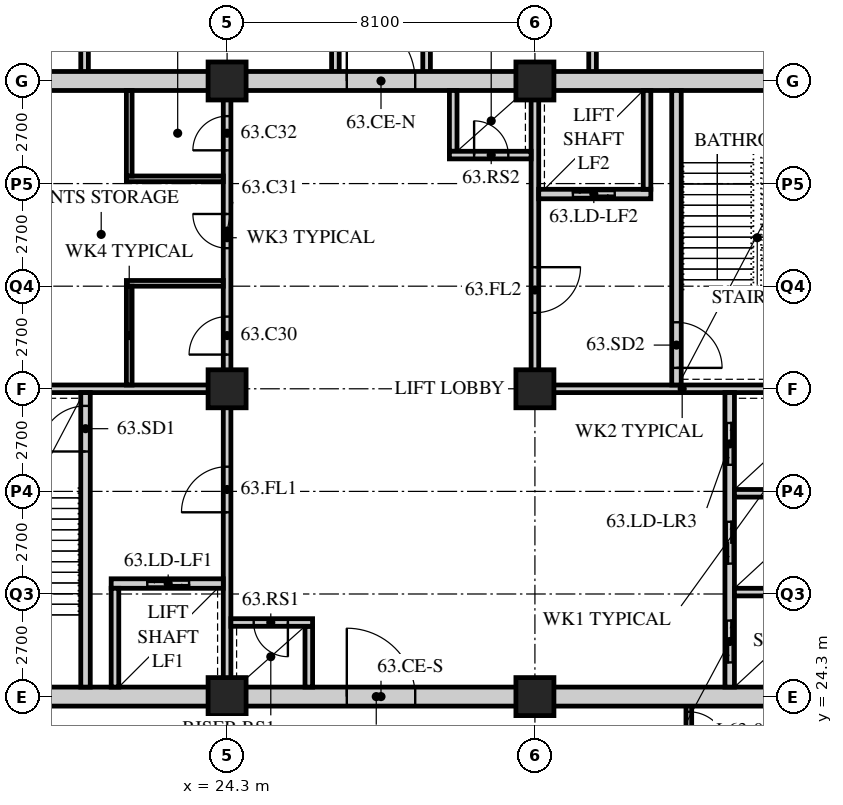
"""IFC4 building model, lengths in metres.
Left out: names, types, materials, properties, quantities, classifications, styles, units other than length and angle.
Written with IfcOpenShell. Run it as: python <this file> out.ifc"""

import sys

from ifc_helpers import new_model, si_unit, direction, frame, frame_2d, origin, origin_2d, place, context, subcontext, project, spatial, rectangle, hollow_rectangle, extrude, element, fill, save


model = new_model("IFC4")
c1 = context("Model", 3, precision=1e-05, world=origin(), true_north=direction((0.0, 1.0)))
c2 = subcontext(c1, "Body", "Model", "MODEL_VIEW")
j1 = project(units=[si_unit("LENGTHUNIT", "METRE"), si_unit("PLANEANGLEUNIT", "RADIAN")], contexts=[c1])
p1 = place(None, origin())
s1 = spatial("IfcSite", under=j1, at=p1, CompositionType="ELEMENT")
p2 = place(p1, origin())
s2 = spatial("IfcBuilding", under=s1, at=p2, CompositionType="ELEMENT")
p3 = place(p2, frame((0.0, 0.0, 246.3)))
s3 = spatial("IfcBuildingStorey", under=s2, at=p3, CompositionType="ELEMENT", Elevation=246.3)
for number, where, z_axis, x_axis in (
    (1, (24.3, 24.3, 0.0), (0.0, 0.0, 1.0), (1.0, 0.0, 0.0)),
    (2, (24.3, 32.4, 0.0), (0.0, 0.0, 1.0), (1.0, 0.0, 0.0)),
    (3, (24.3, 40.5, 0.0), (0.0, 0.0, 1.0), (1.0, 0.0, 0.0)),
    (4, (32.4, 24.3, 0.0), (0.0, 0.0, 1.0), (1.0, 0.0, 0.0)),
    (5, (32.4, 32.4, 0.0), (0.0, 0.0, 1.0), (1.0, 0.0, 0.0)),
    (6, (32.4, 40.5, 0.0), (0.0, 0.0, 1.0), (1.0, 0.0, 0.0)),
):
    element("IfcColumn", number, at=place(p3, frame(where, z_axis=z_axis, x_axis=x_axis)), inside=s3, PredefinedType="COLUMN", context=c2, shape_type="SweptSolid", body=[
        extrude(hollow_rectangle(XDim=1.0, YDim=1.0, WallThickness=0.1, at=origin_2d()), origin(), (0.0, 0.0, 1.0), 3.9),
    ])
for number, where, z_axis, x_axis in (
    (7, (20.55, 50.85, 0.0), (0.0, 0.0, 1.0), (0.0, -1.0, 0.0)),
    (8, (33.917, 50.85, 0.0), (0.0, 0.0, 1.0), (0.0, -1.0, 0.0)),
    (9, (27.15, 40.5, 0.0), (0.0, 0.0, 1.0), (0.0, 1.0, 0.0)),
    (10, (29.55, 40.5, 0.0), (0.0, 0.0, 1.0), (0.0, 1.0, 0.0)),
):
    element("IfcWall", number, at=place(p3, frame(where, z_axis=z_axis, x_axis=x_axis)), inside=s3, PredefinedType="SOLIDWALL", context=c2, shape_type="SweptSolid", body=[
        extrude(rectangle(XDim=10.35, YDim=0.2, at=frame_2d((5.175, 0.0))), origin(), (0.0, 0.0, 1.0), 3.69),
    ])
p4 = place(p3, frame((36.45, 22.5, 0.0), z_axis=(0.0, 0.0, 1.0), x_axis=(0.0, 1.0, 0.0)))
e11 = element("IfcWall", 11, at=p4, inside=s3, PredefinedType="PARTITIONING", context=c2, shape_type="SweptSolid", body=[
    extrude(rectangle(XDim=1.8, YDim=0.15, at=frame_2d((0.9, 0.0))), origin(), (0.0, 0.0, 1.0), 3.69),
])
p5 = place(p4, frame((0.4, 0.0, 0.0)))
e12 = element("IfcOpeningElement", 12, at=p5, cuts=e11, PredefinedType="OPENING", context=c2, shape_type="SweptSolid", body=[
    extrude(rectangle(XDim=1.0, YDim=2.1, at=frame_2d((0.5, 1.05))), frame((0.0, 0.085, 0.0), z_axis=(0.0, -1.0, 0.0), x_axis=(1.0, 0.0, 0.0)), (0.0, 0.0, 1.0), 0.17),
])
p6 = place(p3, frame((15.95, 24.3, 0.0), z_axis=(0.0, 0.0, 1.0), x_axis=(1.0, 0.0, 0.0)))
e13 = element("IfcWall", 13, at=p6, inside=s3, PredefinedType="SOLIDWALL", context=c2, shape_type="SweptSolid", body=[
    extrude(rectangle(XDim=24.55, YDim=0.5, at=frame_2d((12.275, 0.0))), origin(), (0.0, 0.0, 1.0), 3.04),
])
p7 = place(p6, frame((11.5, 0.0, 0.0)))
e14 = element("IfcOpeningElement", 14, at=p7, cuts=e13, PredefinedType="OPENING", context=c2, shape_type="SweptSolid", body=[
    extrude(rectangle(XDim=1.8, YDim=2.4, at=frame_2d((0.9, 1.2))), frame((0.0, 0.26, 0.0), z_axis=(0.0, -1.0, 0.0), x_axis=(1.0, 0.0, 0.0)), (0.0, 0.0, 1.0), 0.52),
])
p8 = place(p3, frame((15.95, 40.5, 0.0), z_axis=(0.0, 0.0, 1.0), x_axis=(1.0, 0.0, 0.0)))
e15 = element("IfcWall", 15, at=p8, inside=s3, PredefinedType="SOLIDWALL", context=c2, shape_type="SweptSolid", body=[
    extrude(rectangle(XDim=24.55, YDim=0.5, at=frame_2d((12.275, 0.0))), origin(), (0.0, 0.0, 1.0), 3.04),
])
p9 = place(p8, frame((11.5, 0.0, 0.0)))
e16 = element("IfcOpeningElement", 16, at=p9, cuts=e15, PredefinedType="OPENING", context=c2, shape_type="SweptSolid", body=[
    extrude(rectangle(XDim=1.8, YDim=2.4, at=frame_2d((0.9, 1.2))), frame((0.0, 0.26, 0.0), z_axis=(0.0, -1.0, 0.0), x_axis=(1.0, 0.0, 0.0)), (0.0, 0.0, 1.0), 0.52),
])
p10 = place(p3, frame((16.45, 32.4, 0.0), z_axis=(0.0, 0.0, 1.0), x_axis=(1.0, 0.0, 0.0)))
e17 = element("IfcWall", 17, at=p10, inside=s3, PredefinedType="SOLIDWALL", context=c2, shape_type="SweptSolid", body=[
    extrude(rectangle(XDim=7.95, YDim=0.2, at=frame_2d((3.975, 0.0))), origin(), (0.0, 0.0, 1.0), 3.078),
])
p11 = place(p3, frame((24.3, 24.55, 0.0), z_axis=(0.0, 0.0, 1.0), x_axis=(0.0, 1.0, 0.0)))
e18 = element("IfcWall", 18, at=p11, inside=s3, PredefinedType="SOLIDWALL", context=c2, shape_type="SweptSolid", body=[
    extrude(rectangle(XDim=7.75, YDim=0.2, at=frame_2d((3.875, 0.0))), origin(), (0.0, 0.0, 1.0), 3.078),
])
p12 = place(p11, frame((4.6, 0.0, 0.0)))
e19 = element("IfcOpeningElement", 19, at=p12, cuts=e18, PredefinedType="OPENING", context=c2, shape_type="SweptSolid", body=[
    extrude(rectangle(XDim=1.2, YDim=2.1, at=frame_2d((0.6, 1.05))), frame((0.0, 0.11, 0.0), z_axis=(0.0, -1.0, 0.0), x_axis=(1.0, 0.0, 0.0)), (0.0, 0.0, 1.0), 0.22),
])
p13 = place(p3, frame((20.575, 24.55, 0.0), z_axis=(0.0, 0.0, 1.0), x_axis=(0.0, 1.0, 0.0)))
e20 = element("IfcWall", 20, at=p13, inside=s3, PredefinedType="SOLIDWALL", context=c2, shape_type="SweptSolid", body=[
    extrude(rectangle(XDim=7.75, YDim=0.25, at=frame_2d((3.875, 0.0))), origin(), (0.0, 0.0, 1.0), 3.69),
])
p14 = place(p13, frame((6.2, 0.0, 0.0)))
e21 = element("IfcOpeningElement", 21, at=p14, cuts=e20, PredefinedType="OPENING", context=c2, shape_type="SweptSolid", body=[
    extrude(rectangle(XDim=1.2, YDim=2.1, at=frame_2d((0.6, 1.05))), frame((0.0, 0.135, 0.0), z_axis=(0.0, -1.0, 0.0), x_axis=(1.0, 0.0, 0.0)), (0.0, 0.0, 1.0), 0.27),
])
p15 = place(p3, frame((21.25, 27.275, 0.0), z_axis=(0.0, 0.0, 1.0), x_axis=(1.0, 0.0, 0.0)))
e22 = element("IfcWall", 22, at=p15, inside=s3, PredefinedType="SOLIDWALL", context=c2, shape_type="SweptSolid", body=[
    extrude(rectangle(XDim=2.95, YDim=0.25, at=frame_2d((1.475, 0.0))), origin(), (0.0, 0.0, 1.0), 3.69),
])
p16 = place(p15, frame((0.95, 0.0, 0.0)))
e23 = element("IfcOpeningElement", 23, at=p16, cuts=e22, PredefinedType="OPENING", context=c2, shape_type="SweptSolid", body=[
    extrude(rectangle(XDim=1.1, YDim=2.4, at=frame_2d((0.55, 1.2))), frame((0.0, 0.135, 0.0), z_axis=(0.0, -1.0, 0.0), x_axis=(1.0, 0.0, 0.0)), (0.0, 0.0, 1.0), 0.27),
])
p17 = place(p3, frame((21.35, 24.55, 0.0), z_axis=(0.0, 0.0, 1.0), x_axis=(0.0, 1.0, 0.0)))
e24 = element("IfcWall", 24, at=p17, inside=s3, PredefinedType="SOLIDWALL", context=c2, shape_type="SweptSolid", body=[
    extrude(rectangle(XDim=2.6, YDim=0.2, at=frame_2d((1.3, 0.0))), origin(), (0.0, 0.0, 1.0), 3.69),
])
p18 = place(p3, frame((26.45, 24.55, 0.0), z_axis=(0.0, 0.0, 1.0), x_axis=(0.0, 1.0, 0.0)))
e25 = element("IfcWall", 25, at=p18, inside=s3, PredefinedType="SOLIDWALL", context=c2, shape_type="SweptSolid", body=[
    extrude(rectangle(XDim=1.6, YDim=0.2, at=frame_2d((0.8, 0.0))), origin(), (0.0, 0.0, 1.0), 3.69),
])
p19 = place(p3, frame((24.4, 26.25, 0.0), z_axis=(0.0, 0.0, 1.0), x_axis=(1.0, 0.0, 0.0)))
e26 = element("IfcWall", 26, at=p19, inside=s3, PredefinedType="SOLIDWALL", context=c2, shape_type="SweptSolid", body=[
    extrude(rectangle(XDim=2.15, YDim=0.2, at=frame_2d((1.075, 0.0))), origin(), (0.0, 0.0, 1.0), 3.69),
])
p20 = place(p19, frame((0.6, 0.0, 0.0)))
e27 = element("IfcOpeningElement", 27, at=p20, cuts=e26, PredefinedType="OPENING", context=c2, shape_type="SweptSolid", body=[
    extrude(rectangle(XDim=0.9, YDim=2.1, at=frame_2d((0.45, 1.05))), frame((0.0, 0.11, 0.0), z_axis=(0.0, -1.0, 0.0), x_axis=(1.0, 0.0, 0.0)), (0.0, 0.0, 1.0), 0.22),
])
p21 = place(p3, frame((32.3, 32.4, 0.0), z_axis=(0.0, 0.0, 1.0), x_axis=(1.0, 0.0, 0.0)))
e28 = element("IfcWall", 28, at=p21, inside=s3, PredefinedType="SOLIDWALL", context=c2, shape_type="SweptSolid", body=[
    extrude(rectangle(XDim=7.95, YDim=0.2, at=frame_2d((3.975, 0.0))), origin(), (0.0, 0.0, 1.0), 3.078),
])
p22 = place(p3, frame((32.4, 32.5, 0.0), z_axis=(0.0, 0.0, 1.0), x_axis=(0.0, 1.0, 0.0)))
e29 = element("IfcWall", 29, at=p22, inside=s3, PredefinedType="SOLIDWALL", context=c2, shape_type="SweptSolid", body=[
    extrude(rectangle(XDim=7.75, YDim=0.2, at=frame_2d((3.875, 0.0))), origin(), (0.0, 0.0, 1.0), 3.078),
])
p23 = place(p22, frame((1.9, 0.0, 0.0)))
e30 = element("IfcOpeningElement", 30, at=p23, cuts=e29, PredefinedType="OPENING", context=c2, shape_type="SweptSolid", body=[
    extrude(rectangle(XDim=1.2, YDim=2.1, at=frame_2d((0.6, 1.05))), frame((0.0, 0.11, 0.0), z_axis=(0.0, -1.0, 0.0), x_axis=(1.0, 0.0, 0.0)), (0.0, 0.0, 1.0), 0.22),
])
p24 = place(p3, frame((37.525, 24.55, 0.0), z_axis=(0.0, 0.0, 1.0), x_axis=(0.0, 1.0, 0.0)))
e31 = element("IfcWall", 31, at=p24, inside=s3, PredefinedType="SOLIDWALL", context=c2, shape_type="SweptSolid", body=[
    extrude(rectangle(XDim=7.75, YDim=0.25, at=frame_2d((3.875, 0.0))), origin(), (0.0, 0.0, 1.0), 3.69),
])
p25 = place(p24, frame((0.65, 0.0, 0.0)))
e32 = element("IfcOpeningElement", 32, at=p25, cuts=e31, PredefinedType="OPENING", context=c2, shape_type="SweptSolid", body=[
    extrude(rectangle(XDim=1.1, YDim=2.4, at=frame_2d((0.55, 1.2))), frame((0.0, 0.135, 0.0), z_axis=(0.0, -1.0, 0.0), x_axis=(1.0, 0.0, 0.0)), (0.0, 0.0, 1.0), 0.27),
])
p26 = place(p24, frame((3.25, 0.0, 0.0)))
e33 = element("IfcOpeningElement", 33, at=p26, cuts=e31, PredefinedType="OPENING", context=c2, shape_type="SweptSolid", body=[
    extrude(rectangle(XDim=1.1, YDim=2.4, at=frame_2d((0.55, 1.2))), frame((0.0, 0.135, 0.0), z_axis=(0.0, -1.0, 0.0), x_axis=(1.0, 0.0, 0.0)), (0.0, 0.0, 1.0), 0.27),
])
p27 = place(p24, frame((5.85, 0.0, 0.0)))
e34 = element("IfcOpeningElement", 34, at=p27, cuts=e31, PredefinedType="OPENING", context=c2, shape_type="SweptSolid", body=[
    extrude(rectangle(XDim=1.1, YDim=2.4, at=frame_2d((0.55, 1.2))), frame((0.0, 0.135, 0.0), z_axis=(0.0, -1.0, 0.0), x_axis=(1.0, 0.0, 0.0)), (0.0, 0.0, 1.0), 0.27),
])
for number, where, z_axis, x_axis in (
    (35, (37.65, 27.05, 0.0), (0.0, 0.0, 1.0), (1.0, 0.0, 0.0)),
    (36, (37.65, 29.65, 0.0), (0.0, 0.0, 1.0), (1.0, 0.0, 0.0)),
):
    element("IfcWall", number, at=place(p3, frame(where, z_axis=z_axis, x_axis=x_axis)), inside=s3, PredefinedType="SOLIDWALL", context=c2, shape_type="SweptSolid", body=[
        extrude(rectangle(XDim=2.6, YDim=0.2, at=frame_2d((1.3, 0.0))), origin(), (0.0, 0.0, 1.0), 3.69),
    ])
p28 = place(p3, frame((36.125, 32.5, 0.0), z_axis=(0.0, 0.0, 1.0), x_axis=(0.0, 1.0, 0.0)))
e37 = element("IfcWall", 37, at=p28, inside=s3, PredefinedType="SOLIDWALL", context=c2, shape_type="SweptSolid", body=[
    extrude(rectangle(XDim=7.75, YDim=0.25, at=frame_2d((3.875, 0.0))), origin(), (0.0, 0.0, 1.0), 3.69),
])
p29 = place(p28, frame((0.45, 0.0, 0.0)))
e38 = element("IfcOpeningElement", 38, at=p29, cuts=e37, PredefinedType="OPENING", context=c2, shape_type="SweptSolid", body=[
    extrude(rectangle(XDim=1.2, YDim=2.1, at=frame_2d((0.6, 1.05))), frame((0.0, 0.135, 0.0), z_axis=(0.0, -1.0, 0.0), x_axis=(1.0, 0.0, 0.0)), (0.0, 0.0, 1.0), 0.27),
])
p30 = place(p3, frame((32.5, 37.525, 0.0), z_axis=(0.0, 0.0, 1.0), x_axis=(1.0, 0.0, 0.0)))
e39 = element("IfcWall", 39, at=p30, inside=s3, PredefinedType="SOLIDWALL", context=c2, shape_type="SweptSolid", body=[
    extrude(rectangle(XDim=2.95, YDim=0.25, at=frame_2d((1.475, 0.0))), origin(), (0.0, 0.0, 1.0), 3.69),
])
p31 = place(p30, frame((0.9, 0.0, 0.0)))
e40 = element("IfcOpeningElement", 40, at=p31, cuts=e39, PredefinedType="OPENING", context=c2, shape_type="SweptSolid", body=[
    extrude(rectangle(XDim=1.1, YDim=2.4, at=frame_2d((0.55, 1.2))), frame((0.0, 0.135, 0.0), z_axis=(0.0, -1.0, 0.0), x_axis=(1.0, 0.0, 0.0)), (0.0, 0.0, 1.0), 0.27),
])
p32 = place(p3, frame((35.35, 37.65, 0.0), z_axis=(0.0, 0.0, 1.0), x_axis=(0.0, 1.0, 0.0)))
e41 = element("IfcWall", 41, at=p32, inside=s3, PredefinedType="SOLIDWALL", context=c2, shape_type="SweptSolid", body=[
    extrude(rectangle(XDim=2.6, YDim=0.2, at=frame_2d((1.3, 0.0))), origin(), (0.0, 0.0, 1.0), 3.69),
])
p33 = place(p3, frame((30.25, 38.65, 0.0), z_axis=(0.0, 0.0, 1.0), x_axis=(0.0, 1.0, 0.0)))
e42 = element("IfcWall", 42, at=p33, inside=s3, PredefinedType="SOLIDWALL", context=c2, shape_type="SweptSolid", body=[
    extrude(rectangle(XDim=1.6, YDim=0.2, at=frame_2d((0.8, 0.0))), origin(), (0.0, 0.0, 1.0), 3.69),
])
p34 = place(p3, frame((30.15, 38.55, 0.0), z_axis=(0.0, 0.0, 1.0), x_axis=(1.0, 0.0, 0.0)))
e43 = element("IfcWall", 43, at=p34, inside=s3, PredefinedType="SOLIDWALL", context=c2, shape_type="SweptSolid", body=[
    extrude(rectangle(XDim=2.15, YDim=0.2, at=frame_2d((1.075, 0.0))), origin(), (0.0, 0.0, 1.0), 3.69),
])
p35 = place(p34, frame((0.65, 0.0, 0.0)))
e44 = element("IfcOpeningElement", 44, at=p35, cuts=e43, PredefinedType="OPENING", context=c2, shape_type="SweptSolid", body=[
    extrude(rectangle(XDim=0.9, YDim=2.1, at=frame_2d((0.45, 1.05))), frame((0.0, 0.11, 0.0), z_axis=(0.0, -1.0, 0.0), x_axis=(1.0, 0.0, 0.0)), (0.0, 0.0, 1.0), 0.22),
])
p36 = place(p3, frame((24.3, 32.5, 0.0), z_axis=(0.0, 0.0, 1.0), x_axis=(0.0, 1.0, 0.0)))
e45 = element("IfcWall", 45, at=p36, inside=s3, PredefinedType="PARTITIONING", context=c2, shape_type="SweptSolid", body=[
    extrude(rectangle(XDim=7.75, YDim=0.2, at=frame_2d((3.875, 0.0))), origin(), (0.0, 0.0, 1.0), 3.078),
])
p37 = place(p36, frame((0.8, 0.0, 0.0)))
e46 = element("IfcOpeningElement", 46, at=p37, cuts=e45, PredefinedType="OPENING", context=c2, shape_type="SweptSolid", body=[
    extrude(rectangle(XDim=1.0, YDim=2.1, at=frame_2d((0.5, 1.05))), frame((0.0, 0.11, 0.0), z_axis=(0.0, -1.0, 0.0), x_axis=(1.0, 0.0, 0.0)), (0.0, 0.0, 1.0), 0.22),
])
p38 = place(p36, frame((3.6, 0.0, 0.0)))
e47 = element("IfcOpeningElement", 47, at=p38, cuts=e45, PredefinedType="OPENING", context=c2, shape_type="SweptSolid", body=[
    extrude(rectangle(XDim=0.9, YDim=2.1, at=frame_2d((0.45, 1.05))), frame((0.0, 0.11, 0.0), z_axis=(0.0, -1.0, 0.0), x_axis=(1.0, 0.0, 0.0)), (0.0, 0.0, 1.0), 0.22),
])
p39 = place(p36, frame((6.175, 0.0, 0.0)))
e48 = element("IfcOpeningElement", 48, at=p39, cuts=e45, PredefinedType="OPENING", context=c2, shape_type="SweptSolid", body=[
    extrude(rectangle(XDim=0.9, YDim=2.1, at=frame_2d((0.45, 1.05))), frame((0.0, 0.11, 0.0), z_axis=(0.0, -1.0, 0.0), x_axis=(1.0, 0.0, 0.0)), (0.0, 0.0, 1.0), 0.22),
])
for number, where, z_axis, x_axis in (
    (49, (21.65, 35.175, 0.0), (0.0, 0.0, 1.0), (1.0, 0.0, 0.0)),
    (50, (21.65, 37.925, 0.0), (0.0, 0.0, 1.0), (1.0, 0.0, 0.0)),
):
    element("IfcWall", number, at=place(p3, frame(where, z_axis=z_axis, x_axis=x_axis)), inside=s3, PredefinedType="PARTITIONING", context=c2, shape_type="SweptSolid", body=[
        extrude(rectangle(XDim=2.55, YDim=0.15, at=frame_2d((1.275, 0.0))), origin(), (0.0, 0.0, 1.0), 3.69),
    ])
p40 = place(p3, frame((21.725, 32.5, 0.0), z_axis=(0.0, 0.0, 1.0), x_axis=(0.0, 1.0, 0.0)))
e51 = element("IfcWall", 51, at=p40, inside=s3, PredefinedType="PARTITIONING", context=c2, shape_type="SweptSolid", body=[
    extrude(rectangle(XDim=2.6, YDim=0.15, at=frame_2d((1.3, 0.0))), origin(), (0.0, 0.0, 1.0), 3.69),
])
p41 = place(p3, frame((21.725, 38.0, 0.0), z_axis=(0.0, 0.0, 1.0), x_axis=(0.0, 1.0, 0.0)))
e52 = element("IfcWall", 52, at=p41, inside=s3, PredefinedType="PARTITIONING", context=c2, shape_type="SweptSolid", body=[
    extrude(rectangle(XDim=2.25, YDim=0.15, at=frame_2d((1.125, 0.0))), origin(), (0.0, 0.0, 1.0), 3.69),
])
p42 = place(p5, origin())
e53 = element("IfcDoor", 53, at=p42, inside=s3, OperationType="SINGLE_SWING_RIGHT", PredefinedType="DOOR", context=c2, shape_type="SweptSolid", body=[
    extrude(rectangle(XDim=1.0, YDim=2.1, at=frame_2d((0.5, 1.05))), frame((0.0, 0.025, 0.0), z_axis=(0.0, -1.0, 0.0), x_axis=(1.0, 0.0, 0.0)), (0.0, 0.0, 1.0), 0.05),
])
fill(e12, e53)
p43 = place(p37, origin())
e54 = element("IfcDoor", 54, at=p43, inside=s3, OperationType="SINGLE_SWING_LEFT", PredefinedType="DOOR", context=c2, shape_type="SweptSolid", body=[
    extrude(rectangle(XDim=1.0, YDim=2.1, at=frame_2d((0.5, 1.05))), frame((0.0, 0.025, 0.0), z_axis=(0.0, -1.0, 0.0), x_axis=(1.0, 0.0, 0.0)), (0.0, 0.0, 1.0), 0.05),
])
fill(e46, e54)
p44 = place(p38, origin())
e55 = element("IfcDoor", 55, at=p44, inside=s3, OperationType="SINGLE_SWING_RIGHT", PredefinedType="DOOR", context=c2, shape_type="SweptSolid", body=[
    extrude(rectangle(XDim=0.9, YDim=2.1, at=frame_2d((0.45, 1.05))), frame((0.0, 0.025, 0.0), z_axis=(0.0, -1.0, 0.0), x_axis=(1.0, 0.0, 0.0)), (0.0, 0.0, 1.0), 0.05),
])
fill(e47, e55)
p45 = place(p39, origin())
e56 = element("IfcDoor", 56, at=p45, inside=s3, OperationType="SINGLE_SWING_LEFT", PredefinedType="DOOR", context=c2, shape_type="SweptSolid", body=[
    extrude(rectangle(XDim=0.9, YDim=2.1, at=frame_2d((0.45, 1.05))), frame((0.0, 0.025, 0.0), z_axis=(0.0, -1.0, 0.0), x_axis=(1.0, 0.0, 0.0)), (0.0, 0.0, 1.0), 0.05),
])
fill(e48, e56)
p46 = place(p14, origin())
e57 = element("IfcDoor", 57, at=p46, inside=s3, OperationType="SINGLE_SWING_LEFT", PredefinedType="DOOR", context=c2, shape_type="SweptSolid", body=[
    extrude(rectangle(XDim=1.2, YDim=2.1, at=frame_2d((0.6, 1.05))), frame((0.0, 0.025, 0.0), z_axis=(0.0, -1.0, 0.0), x_axis=(1.0, 0.0, 0.0)), (0.0, 0.0, 1.0), 0.05),
])
fill(e21, e57)
p47 = place(p12, origin())
e58 = element("IfcDoor", 58, at=p47, inside=s3, OperationType="SINGLE_SWING_LEFT", PredefinedType="DOOR", context=c2, shape_type="SweptSolid", body=[
    extrude(rectangle(XDim=1.2, YDim=2.1, at=frame_2d((0.6, 1.05))), frame((0.0, 0.025, 0.0), z_axis=(0.0, -1.0, 0.0), x_axis=(1.0, 0.0, 0.0)), (0.0, 0.0, 1.0), 0.05),
])
fill(e19, e58)
p48 = place(p20, origin())
e59 = element("IfcDoor", 59, at=p48, inside=s3, OperationType="SINGLE_SWING_LEFT", PredefinedType="DOOR", context=c2, shape_type="SweptSolid", body=[
    extrude(rectangle(XDim=0.9, YDim=2.1, at=frame_2d((0.45, 1.05))), frame((0.0, 0.025, 0.0), z_axis=(0.0, -1.0, 0.0), x_axis=(1.0, 0.0, 0.0)), (0.0, 0.0, 1.0), 0.05),
])
fill(e27, e59)
p49 = place(p29, origin())
e60 = element("IfcDoor", 60, at=p49, inside=s3, OperationType="SINGLE_SWING_RIGHT", PredefinedType="DOOR", context=c2, shape_type="SweptSolid", body=[
    extrude(rectangle(XDim=1.2, YDim=2.1, at=frame_2d((0.6, 1.05))), frame((0.0, 0.025, 0.0), z_axis=(0.0, -1.0, 0.0), x_axis=(1.0, 0.0, 0.0)), (0.0, 0.0, 1.0), 0.05),
])
fill(e38, e60)
p50 = place(p23, origin())
e61 = element("IfcDoor", 61, at=p50, inside=s3, OperationType="SINGLE_SWING_LEFT", PredefinedType="DOOR", context=c2, shape_type="SweptSolid", body=[
    extrude(rectangle(XDim=1.2, YDim=2.1, at=frame_2d((0.6, 1.05))), frame((0.0, 0.025, 0.0), z_axis=(0.0, -1.0, 0.0), x_axis=(1.0, 0.0, 0.0)), (0.0, 0.0, 1.0), 0.05),
])
fill(e30, e61)
p51 = place(p35, origin())
e62 = element("IfcDoor", 62, at=p51, inside=s3, OperationType="SINGLE_SWING_LEFT", PredefinedType="DOOR", context=c2, shape_type="SweptSolid", body=[
    extrude(rectangle(XDim=0.9, YDim=2.1, at=frame_2d((0.45, 1.05))), frame((0.0, 0.025, 0.0), z_axis=(0.0, -1.0, 0.0), x_axis=(1.0, 0.0, 0.0)), (0.0, 0.0, 1.0), 0.05),
])
fill(e44, e62)
p52 = place(p25, origin())
e63 = element("IfcDoor", 63, at=p52, inside=s3, OperationType="DOUBLE_DOOR_SLIDING", PredefinedType="DOOR", context=c2, shape_type="SweptSolid", body=[
    extrude(rectangle(XDim=1.1, YDim=2.4, at=frame_2d((0.55, 1.2))), frame((0.0, 0.025, 0.0), z_axis=(0.0, -1.0, 0.0), x_axis=(1.0, 0.0, 0.0)), (0.0, 0.0, 1.0), 0.05),
])
fill(e32, e63)
p53 = place(p26, origin())
e64 = element("IfcDoor", 64, at=p53, inside=s3, OperationType="DOUBLE_DOOR_SLIDING", PredefinedType="DOOR", context=c2, shape_type="SweptSolid", body=[
    extrude(rectangle(XDim=1.1, YDim=2.4, at=frame_2d((0.55, 1.2))), frame((0.0, 0.025, 0.0), z_axis=(0.0, -1.0, 0.0), x_axis=(1.0, 0.0, 0.0)), (0.0, 0.0, 1.0), 0.05),
])
fill(e33, e64)
p54 = place(p27, origin())
e65 = element("IfcDoor", 65, at=p54, inside=s3, OperationType="DOUBLE_DOOR_SLIDING", PredefinedType="DOOR", context=c2, shape_type="SweptSolid", body=[
    extrude(rectangle(XDim=1.1, YDim=2.4, at=frame_2d((0.55, 1.2))), frame((0.0, 0.025, 0.0), z_axis=(0.0, -1.0, 0.0), x_axis=(1.0, 0.0, 0.0)), (0.0, 0.0, 1.0), 0.05),
])
fill(e34, e65)
p55 = place(p16, origin())
e66 = element("IfcDoor", 66, at=p55, inside=s3, OperationType="DOUBLE_DOOR_SLIDING", PredefinedType="DOOR", context=c2, shape_type="SweptSolid", body=[
    extrude(rectangle(XDim=1.1, YDim=2.4, at=frame_2d((0.55, 1.2))), frame((0.0, 0.025, 0.0), z_axis=(0.0, -1.0, 0.0), x_axis=(1.0, 0.0, 0.0)), (0.0, 0.0, 1.0), 0.05),
])
fill(e23, e66)
p56 = place(p31, origin())
e67 = element("IfcDoor", 67, at=p56, inside=s3, OperationType="DOUBLE_DOOR_SLIDING", PredefinedType="DOOR", context=c2, shape_type="SweptSolid", body=[
    extrude(rectangle(XDim=1.1, YDim=2.4, at=frame_2d((0.55, 1.2))), frame((0.0, 0.025, 0.0), z_axis=(0.0, -1.0, 0.0), x_axis=(1.0, 0.0, 0.0)), (0.0, 0.0, 1.0), 0.05),
])
fill(e40, e67)
p57 = place(p7, origin())
e68 = element("IfcDoor", 68, at=p57, inside=s3, OperationType="DOUBLE_DOOR_SINGLE_SWING", PredefinedType="DOOR", context=c2, shape_type="SweptSolid", body=[
    extrude(rectangle(XDim=1.8, YDim=2.4, at=frame_2d((0.9, 1.2))), frame((0.0, 0.025, 0.0), z_axis=(0.0, -1.0, 0.0), x_axis=(1.0, 0.0, 0.0)), (0.0, 0.0, 1.0), 0.05),
])
fill(e14, e68)
p58 = place(p9, origin())
e69 = element("IfcDoor", 69, at=p58, inside=s3, OperationType="DOUBLE_DOOR_SINGLE_SWING", PredefinedType="DOOR", context=c2, shape_type="SweptSolid", body=[
    extrude(rectangle(XDim=1.8, YDim=2.4, at=frame_2d((0.9, 1.2))), frame((0.0, 0.025, 0.0), z_axis=(0.0, -1.0, 0.0), x_axis=(1.0, 0.0, 0.0)), (0.0, 0.0, 1.0), 0.05),
])
fill(e16, e69)
save(model, sys.argv[1])
